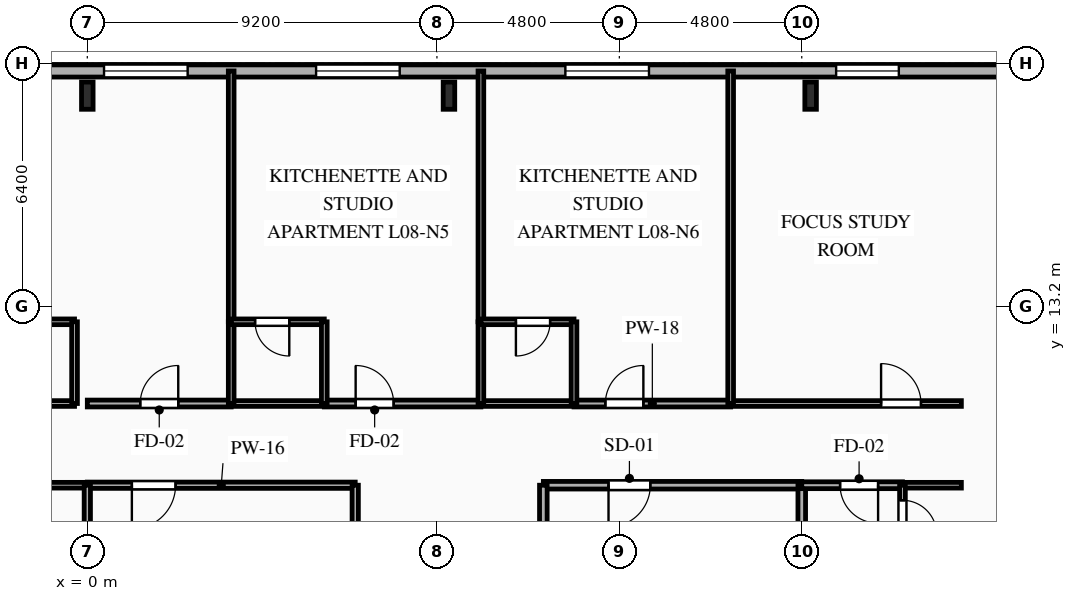
"""IFC4 building model, lengths in metres.
Left out: names, types, materials, properties, quantities, classifications, styles, units other than length and angle.
Written with IfcOpenShell. Run it as: python <this file> out.ifc"""

import sys

from ifc_helpers import new_model, si_unit, direction, frame, frame_2d, origin, origin_2d, place, context, subcontext, project, spatial, rectangle, i_section, extrude, element, fill, save


model = new_model("IFC4")
c1 = context("Model", 3, precision=1e-05, world=origin(), true_north=direction((0.0, 1.0)))
c2 = subcontext(c1, "Body", "Model", "MODEL_VIEW")
j1 = project(units=[si_unit("LENGTHUNIT", "METRE"), si_unit("PLANEANGLEUNIT", "RADIAN")], contexts=[c1])
p1 = place(None, origin())
s1 = spatial("IfcSite", under=j1, at=p1, CompositionType="ELEMENT")
p2 = place(p1, origin())
s2 = spatial("IfcBuilding", under=s1, at=p2, CompositionType="ELEMENT")
p3 = place(p2, frame((0.0, 0.0, 33.7)))
s3 = spatial("IfcBuildingStorey", under=s2, at=p3, CompositionType="ELEMENT", Elevation=33.7)
for number, where, z_axis, x_axis in (
    (1, (19.033, 18.75, 0.0), (0.0, 0.0, 1.0), (1.0, 0.0, 0.0)),
    (2, (9.517, 18.75, 0.0), (0.0, 0.0, 1.0), (1.0, 0.0, 0.0)),
    (3, (0.0, 18.75, 0.0), (0.0, 0.0, 1.0), (1.0, 0.0, 0.0)),
):
    element("IfcColumn", number, at=place(p3, frame(where, z_axis=z_axis, x_axis=x_axis)), inside=s3, PredefinedType="COLUMN", context=c2, shape_type="SweptSolid", body=[
        extrude(i_section(OverallWidth=0.304, OverallDepth=0.716, WebThickness=0.021, FlangeThickness=0.04, FilletRadius=0.027, at=origin_2d()), origin(), (0.0, 0.0, 1.0), 3.35),
    ])
p4 = place(p3, frame((-29.2, 19.4, 0.0), z_axis=(0.0, 0.0, 1.0), x_axis=(1.0, 0.0, 0.0)))
e4 = element("IfcWall", 4, at=p4, inside=s3, PredefinedType="SOLIDWALL", context=c2, shape_type="SweptSolid", body=[
    extrude(rectangle(XDim=58.4, YDim=0.32, at=frame_2d((29.2, 0.0))), origin(), (0.0, 0.0, 1.0), 3.035),
])
p5 = place(p4, frame((8.261, 0.0, 0.85)))
e5 = element("IfcOpeningElement", 5, at=p5, cuts=e4, PredefinedType="OPENING", context=c2, shape_type="SweptSolid", body=[
    extrude(rectangle(XDim=1.65, YDim=1.85, at=frame_2d((0.825, 0.925))), frame((0.0, 0.17, 0.0), z_axis=(0.0, -1.0, 0.0), x_axis=(1.0, 0.0, 0.0)), (0.0, 0.0, 1.0), 0.34),
])
p6 = place(p4, frame((17.05, 0.0, 0.85)))
e6 = element("IfcOpeningElement", 6, at=p6, cuts=e4, PredefinedType="OPENING", context=c2, shape_type="SweptSolid", body=[
    extrude(rectangle(XDim=1.5, YDim=1.85, at=frame_2d((0.75, 0.925))), frame((0.0, 0.17, 0.0), z_axis=(0.0, -1.0, 0.0), x_axis=(1.0, 0.0, 0.0)), (0.0, 0.0, 1.0), 0.34),
])
p7 = place(p4, frame((22.1, 0.0, 0.85)))
e7 = element("IfcOpeningElement", 7, at=p7, cuts=e4, PredefinedType="OPENING", context=c2, shape_type="SweptSolid", body=[
    extrude(rectangle(XDim=2.2, YDim=1.85, at=frame_2d((1.1, 0.925))), frame((0.0, 0.17, 0.0), z_axis=(0.0, -1.0, 0.0), x_axis=(1.0, 0.0, 0.0)), (0.0, 0.0, 1.0), 0.34),
])
p8 = place(p4, frame((29.64, 0.0, 0.85)))
e8 = element("IfcOpeningElement", 8, at=p8, cuts=e4, PredefinedType="OPENING", context=c2, shape_type="SweptSolid", body=[
    extrude(rectangle(XDim=2.2, YDim=1.85, at=frame_2d((1.1, 0.925))), frame((0.0, 0.17, 0.0), z_axis=(0.0, -1.0, 0.0), x_axis=(1.0, 0.0, 0.0)), (0.0, 0.0, 1.0), 0.34),
])
p9 = place(p4, frame((35.22, 0.0, 0.85)))
e9 = element("IfcOpeningElement", 9, at=p9, cuts=e4, PredefinedType="OPENING", context=c2, shape_type="SweptSolid", body=[
    extrude(rectangle(XDim=2.2, YDim=1.85, at=frame_2d((1.1, 0.925))), frame((0.0, 0.17, 0.0), z_axis=(0.0, -1.0, 0.0), x_axis=(1.0, 0.0, 0.0)), (0.0, 0.0, 1.0), 0.34),
])
p10 = place(p4, frame((41.78, 0.0, 0.85)))
e10 = element("IfcOpeningElement", 10, at=p10, cuts=e4, PredefinedType="OPENING", context=c2, shape_type="SweptSolid", body=[
    extrude(rectangle(XDim=2.2, YDim=1.85, at=frame_2d((1.1, 0.925))), frame((0.0, 0.17, 0.0), z_axis=(0.0, -1.0, 0.0), x_axis=(1.0, 0.0, 0.0)), (0.0, 0.0, 1.0), 0.34),
])
p11 = place(p4, frame((48.905, 0.0, 0.85)))
e11 = element("IfcOpeningElement", 11, at=p11, cuts=e4, PredefinedType="OPENING", context=c2, shape_type="SweptSolid", body=[
    extrude(rectangle(XDim=1.65, YDim=1.85, at=frame_2d((0.825, 0.925))), frame((0.0, 0.17, 0.0), z_axis=(0.0, -1.0, 0.0), x_axis=(1.0, 0.0, 0.0)), (0.0, 0.0, 1.0), 0.34),
])
p12 = place(p3, frame((18.8, 8.5, 0.0), z_axis=(0.0, 0.0, 1.0), x_axis=(-1.0, 0.0, 0.0)))
e12 = element("IfcWall", 12, at=p12, inside=s3, PredefinedType="PARTITIONING", context=c2, shape_type="SweptSolid", body=[
    extrude(rectangle(XDim=6.8, YDim=0.2, at=frame_2d((3.4, 0.0))), origin(), (0.0, 0.0, 1.0), 3.035),
])
p13 = place(p12, frame((3.985, 0.0, 0.0)))
e13 = element("IfcOpeningElement", 13, at=p13, cuts=e12, PredefinedType="OPENING", context=c2, shape_type="SweptSolid", body=[
    extrude(rectangle(XDim=1.1, YDim=2.15, at=frame_2d((0.55, 1.075))), frame((0.0, 0.11, 0.0), z_axis=(0.0, -1.0, 0.0), x_axis=(1.0, 0.0, 0.0)), (0.0, 0.0, 1.0), 0.22),
])
p14 = place(p3, frame((12.0, 8.5, 0.0), z_axis=(0.0, 0.0, 1.0), x_axis=(0.0, -1.0, 0.0)))
e14 = element("IfcWall", 14, at=p14, inside=s3, PredefinedType="PARTITIONING", context=c2, shape_type="SweptSolid", body=[
    extrude(rectangle(XDim=2.9, YDim=0.2, at=frame_2d((1.45, 0.0))), origin(), (0.0, 0.0, 1.0), 3.035),
])
p15 = place(p3, frame((18.8, 5.6, 0.0), z_axis=(0.0, 0.0, 1.0), x_axis=(0.0, 1.0, 0.0)))
e15 = element("IfcWall", 15, at=p15, inside=s3, PredefinedType="PARTITIONING", context=c2, shape_type="SweptSolid", body=[
    extrude(rectangle(XDim=2.9, YDim=0.2, at=frame_2d((1.45, 0.0))), origin(), (0.0, 0.0, 1.0), 2.52),
])
p16 = place(p3, frame((-2.786, 10.65, 0.0), z_axis=(0.0, 0.0, 1.0), x_axis=(1.0, 0.0, 0.0)))
e16 = element("IfcWall", 16, at=p16, inside=s3, PredefinedType="PLUMBINGWALL", context=c2, shape_type="SweptSolid", body=[
    extrude(rectangle(XDim=2.45, YDim=0.15, at=frame_2d((1.225, 0.0))), origin(), (0.0, 0.0, 1.0), 3.035),
])
p17 = place(p3, frame((0.0, 8.5, 0.0), z_axis=(0.0, 0.0, 1.0), x_axis=(-1.0, 0.0, 0.0)))
e17 = element("IfcWall", 17, at=p17, inside=s3, PredefinedType="PARTITIONING", context=c2, shape_type="SweptSolid", body=[
    extrude(rectangle(XDim=7.05, YDim=0.15, at=frame_2d((3.525, 0.0))), origin(), (0.0, 0.0, 1.0), 3.035),
])
p18 = place(p3, frame((21.45, 8.5, 0.0), z_axis=(0.0, 0.0, 1.0), x_axis=(-1.0, 0.0, 0.0)))
e18 = element("IfcWall", 18, at=p18, inside=s3, PredefinedType="PARTITIONING", context=c2, shape_type="SweptSolid", body=[
    extrude(rectangle(XDim=2.65, YDim=0.18, at=frame_2d((1.325, 0.0))), origin(), (0.0, 0.0, 1.0), 3.035),
])
p19 = place(p18, frame((0.641, 0.0, 0.0)))
e19 = element("IfcOpeningElement", 19, at=p19, cuts=e18, PredefinedType="OPENING", context=c2, shape_type="SweptSolid", body=[
    extrude(rectangle(XDim=1.0, YDim=2.15, at=frame_2d((0.5, 1.075))), frame((0.0, 0.1, 0.0), z_axis=(0.0, -1.0, 0.0), x_axis=(1.0, 0.0, 0.0)), (0.0, 0.0, 1.0), 0.2),
])
p20 = place(p3, frame((23.0, 8.5, 0.0), z_axis=(0.0, 0.0, 1.0), x_axis=(-1.0, 0.0, 0.0)))
e20 = element("IfcWall", 20, at=p20, inside=s3, PredefinedType="PARTITIONING", context=c2, shape_type="SweptSolid", body=[
    extrude(rectangle(XDim=1.55, YDim=0.15, at=frame_2d((0.775, 0.0))), origin(), (0.0, 0.0, 1.0), 3.035),
])
p21 = place(p3, frame((0.0, 10.65, 0.0), z_axis=(0.0, 0.0, 1.0), x_axis=(1.0, 0.0, 0.0)))
e21 = element("IfcWall", 21, at=p21, inside=s3, PredefinedType="PARTITIONING", context=c2, shape_type="SweptSolid", body=[
    extrude(rectangle(XDim=3.786, YDim=0.18, at=frame_2d((1.893, 0.0))), origin(), (0.0, 0.0, 1.0), 3.035),
])
p22 = place(p21, frame((1.393, 0.0, 0.0)))
e22 = element("IfcOpeningElement", 22, at=p22, cuts=e21, PredefinedType="OPENING", context=c2, shape_type="SweptSolid", body=[
    extrude(rectangle(XDim=1.0, YDim=2.15, at=frame_2d((0.5, 1.075))), frame((0.0, 0.1, 0.0), z_axis=(0.0, -1.0, 0.0), x_axis=(1.0, 0.0, 0.0)), (0.0, 0.0, 1.0), 0.2),
])
p23 = place(p3, frame((6.236, 10.65, 0.0), z_axis=(0.0, 0.0, 1.0), x_axis=(1.0, 0.0, 0.0)))
e23 = element("IfcWall", 23, at=p23, inside=s3, PredefinedType="PARTITIONING", context=c2, shape_type="SweptSolid", body=[
    extrude(rectangle(XDim=4.121, YDim=0.18, at=frame_2d((2.061, 0.0))), origin(), (0.0, 0.0, 1.0), 3.035),
])
p24 = place(p23, frame((0.825, 0.0, 0.0)))
e24 = element("IfcOpeningElement", 24, at=p24, cuts=e23, PredefinedType="OPENING", context=c2, shape_type="SweptSolid", body=[
    extrude(rectangle(XDim=1.0, YDim=2.15, at=frame_2d((0.5, 1.075))), frame((0.0, 0.1, 0.0), z_axis=(0.0, -1.0, 0.0), x_axis=(1.0, 0.0, 0.0)), (0.0, 0.0, 1.0), 0.2),
])
p25 = place(p3, frame((3.786, 10.65, 0.0), z_axis=(0.0, 0.0, 1.0), x_axis=(1.0, 0.0, 0.0)))
e25 = element("IfcWall", 25, at=p25, inside=s3, PredefinedType="PLUMBINGWALL", context=c2, shape_type="SweptSolid", body=[
    extrude(rectangle(XDim=2.45, YDim=0.15, at=frame_2d((1.225, 0.0))), origin(), (0.0, 0.0, 1.0), 3.035),
])
p26 = place(p3, frame((12.807, 10.65, 0.0), z_axis=(0.0, 0.0, 1.0), x_axis=(1.0, 0.0, 0.0)))
e26 = element("IfcWall", 26, at=p26, inside=s3, PredefinedType="PARTITIONING", context=c2, shape_type="SweptSolid", body=[
    extrude(rectangle(XDim=4.122, YDim=0.18, at=frame_2d((2.061, 0.0))), origin(), (0.0, 0.0, 1.0), 3.035),
])
p27 = place(p26, frame((0.825, 0.0, 0.0)))
e27 = element("IfcOpeningElement", 27, at=p27, cuts=e26, PredefinedType="OPENING", context=c2, shape_type="SweptSolid", body=[
    extrude(rectangle(XDim=1.0, YDim=2.15, at=frame_2d((0.5, 1.075))), frame((0.0, 0.1, 0.0), z_axis=(0.0, -1.0, 0.0), x_axis=(1.0, 0.0, 0.0)), (0.0, 0.0, 1.0), 0.2),
])
p28 = place(p3, frame((10.357, 10.65, 0.0), z_axis=(0.0, 0.0, 1.0), x_axis=(1.0, 0.0, 0.0)))
e28 = element("IfcWall", 28, at=p28, inside=s3, PredefinedType="PLUMBINGWALL", context=c2, shape_type="SweptSolid", body=[
    extrude(rectangle(XDim=2.45, YDim=0.15, at=frame_2d((1.225, 0.0))), origin(), (0.0, 0.0, 1.0), 3.035),
])
p29 = place(p3, frame((16.929, 10.65, 0.0), z_axis=(0.0, 0.0, 1.0), x_axis=(1.0, 0.0, 0.0)))
e29 = element("IfcWall", 29, at=p29, inside=s3, PredefinedType="PARTITIONING", context=c2, shape_type="SweptSolid", body=[
    extrude(rectangle(XDim=6.071, YDim=0.15, at=frame_2d((3.036, 0.0))), origin(), (0.0, 0.0, 1.0), 3.035),
])
p30 = place(p29, frame((3.958, 0.0, 0.0)))
e30 = element("IfcOpeningElement", 30, at=p30, cuts=e29, PredefinedType="OPENING", context=c2, shape_type="SweptSolid", body=[
    extrude(rectangle(XDim=1.05, YDim=2.15, at=frame_2d((0.525, 1.075))), frame((0.0, 0.085, 0.0), z_axis=(0.0, -1.0, 0.0), x_axis=(1.0, 0.0, 0.0)), (0.0, 0.0, 1.0), 0.17),
])
p31 = place(p3, frame((7.05, 8.5, 0.0), z_axis=(0.0, 0.0, 1.0), x_axis=(-1.0, 0.0, 0.0)))
e31 = element("IfcWall", 31, at=p31, inside=s3, PredefinedType="PARTITIONING", context=c2, shape_type="SweptSolid", body=[
    extrude(rectangle(XDim=7.05, YDim=0.165, at=frame_2d((3.525, 0.0))), origin(), (0.0, 0.0, 1.0), 3.035),
])
p32 = place(p31, frame((4.728, 0.0, 0.0)))
e32 = element("IfcOpeningElement", 32, at=p32, cuts=e31, PredefinedType="OPENING", context=c2, shape_type="SweptSolid", body=[
    extrude(rectangle(XDim=1.15, YDim=2.15, at=frame_2d((0.575, 1.075))), frame((0.0, 0.093, 0.0), z_axis=(0.0, -1.0, 0.0), x_axis=(1.0, 0.0, 0.0)), (0.0, 0.0, 1.0), 0.185),
])
p33 = place(p3, frame((7.05, 1.45, 0.0), z_axis=(0.0, 0.0, 1.0), x_axis=(0.0, 1.0, 0.0)))
e33 = element("IfcWall", 33, at=p33, inside=s3, PredefinedType="PARTITIONING", context=c2, shape_type="SweptSolid", body=[
    extrude(rectangle(XDim=7.05, YDim=0.165, at=frame_2d((3.525, 0.0))), origin(), (0.0, 0.0, 1.0), 3.035),
])
p34 = place(p3, frame((21.45, 8.5, 0.0), z_axis=(0.0, 0.0, 1.0), x_axis=(0.0, -1.0, 0.0)))
e34 = element("IfcWall", 34, at=p34, inside=s3, PredefinedType="PARTITIONING", context=c2, shape_type="SweptSolid", body=[
    extrude(rectangle(XDim=1.692, YDim=0.15, at=frame_2d((0.846, 0.0))), origin(), (0.0, 0.0, 1.0), 3.035),
])
p35 = place(p34, frame((0.396, 0.0, 0.0)))
e35 = element("IfcOpeningElement", 35, at=p35, cuts=e34, PredefinedType="OPENING", context=c2, shape_type="SweptSolid", body=[
    extrude(rectangle(XDim=0.9, YDim=2.1, at=frame_2d((0.45, 1.05))), frame((0.0, 0.085, 0.0), z_axis=(0.0, -1.0, 0.0), x_axis=(1.0, 0.0, 0.0)), (0.0, 0.0, 1.0), 0.17),
])
p36 = place(p3, frame((-0.336, 12.8, 0.0), z_axis=(0.0, 0.0, 1.0), x_axis=(-1.0, 0.0, 0.0)))
e36 = element("IfcWall", 36, at=p36, inside=s3, PredefinedType="PLUMBINGWALL", context=c2, shape_type="SweptSolid", body=[
    extrude(rectangle(XDim=2.45, YDim=0.15, at=frame_2d((1.225, 0.0))), origin(), (0.0, 0.0, 1.0), 3.035),
])
p37 = place(p36, frame((0.921, 0.0, 0.0)))
e37 = element("IfcOpeningElement", 37, at=p37, cuts=e36, PredefinedType="OPENING", context=c2, shape_type="SweptSolid", body=[
    extrude(rectangle(XDim=0.9, YDim=2.1, at=frame_2d((0.45, 1.05))), frame((0.0, 0.085, 0.0), z_axis=(0.0, -1.0, 0.0), x_axis=(1.0, 0.0, 0.0)), (0.0, 0.0, 1.0), 0.17),
])
p38 = place(p3, frame((-0.336, 10.65, 0.0), z_axis=(0.0, 0.0, 1.0), x_axis=(0.0, 1.0, 0.0)))
e38 = element("IfcWall", 38, at=p38, inside=s3, PredefinedType="PLUMBINGWALL", context=c2, shape_type="SweptSolid", body=[
    extrude(rectangle(XDim=2.15, YDim=0.15, at=frame_2d((1.075, 0.0))), origin(), (0.0, 0.0, 1.0), 3.035),
])
p39 = place(p3, frame((3.786, 19.4, 0.0), z_axis=(0.0, 0.0, 1.0), x_axis=(0.0, -1.0, 0.0)))
e39 = element("IfcWall", 39, at=p39, inside=s3, PredefinedType="PARTITIONING", context=c2, shape_type="SweptSolid", body=[
    extrude(rectangle(XDim=6.6, YDim=0.15, at=frame_2d((3.3, 0.0))), origin(), (0.0, 0.0, 1.0), 3.035),
])
p40 = place(p3, frame((3.786, 12.8, 0.0), z_axis=(0.0, 0.0, 1.0), x_axis=(0.0, -1.0, 0.0)))
e40 = element("IfcWall", 40, at=p40, inside=s3, PredefinedType="PLUMBINGWALL", context=c2, shape_type="SweptSolid", body=[
    extrude(rectangle(XDim=2.15, YDim=0.15, at=frame_2d((1.075, 0.0))), origin(), (0.0, 0.0, 1.0), 3.035),
])
p41 = place(p3, frame((6.236, 12.8, 0.0), z_axis=(0.0, 0.0, 1.0), x_axis=(-1.0, 0.0, 0.0)))
e41 = element("IfcWall", 41, at=p41, inside=s3, PredefinedType="PLUMBINGWALL", context=c2, shape_type="SweptSolid", body=[
    extrude(rectangle(XDim=2.45, YDim=0.15, at=frame_2d((1.225, 0.0))), origin(), (0.0, 0.0, 1.0), 3.035),
])
p42 = place(p41, frame((0.921, 0.0, 0.0)))
e42 = element("IfcOpeningElement", 42, at=p42, cuts=e41, PredefinedType="OPENING", context=c2, shape_type="SweptSolid", body=[
    extrude(rectangle(XDim=0.9, YDim=2.1, at=frame_2d((0.45, 1.05))), frame((0.0, 0.085, 0.0), z_axis=(0.0, -1.0, 0.0), x_axis=(1.0, 0.0, 0.0)), (0.0, 0.0, 1.0), 0.17),
])
p43 = place(p3, frame((6.236, 10.65, 0.0), z_axis=(0.0, 0.0, 1.0), x_axis=(0.0, 1.0, 0.0)))
e43 = element("IfcWall", 43, at=p43, inside=s3, PredefinedType="PLUMBINGWALL", context=c2, shape_type="SweptSolid", body=[
    extrude(rectangle(XDim=2.15, YDim=0.15, at=frame_2d((1.075, 0.0))), origin(), (0.0, 0.0, 1.0), 3.035),
])
p44 = place(p3, frame((10.357, 19.4, 0.0), z_axis=(0.0, 0.0, 1.0), x_axis=(0.0, -1.0, 0.0)))
e44 = element("IfcWall", 44, at=p44, inside=s3, PredefinedType="PARTITIONING", context=c2, shape_type="SweptSolid", body=[
    extrude(rectangle(XDim=6.6, YDim=0.15, at=frame_2d((3.3, 0.0))), origin(), (0.0, 0.0, 1.0), 3.035),
])
p45 = place(p3, frame((10.357, 12.8, 0.0), z_axis=(0.0, 0.0, 1.0), x_axis=(0.0, -1.0, 0.0)))
e45 = element("IfcWall", 45, at=p45, inside=s3, PredefinedType="PLUMBINGWALL", context=c2, shape_type="SweptSolid", body=[
    extrude(rectangle(XDim=2.15, YDim=0.15, at=frame_2d((1.075, 0.0))), origin(), (0.0, 0.0, 1.0), 3.035),
])
p46 = place(p3, frame((12.807, 12.8, 0.0), z_axis=(0.0, 0.0, 1.0), x_axis=(-1.0, 0.0, 0.0)))
e46 = element("IfcWall", 46, at=p46, inside=s3, PredefinedType="PLUMBINGWALL", context=c2, shape_type="SweptSolid", body=[
    extrude(rectangle(XDim=2.45, YDim=0.15, at=frame_2d((1.225, 0.0))), origin(), (0.0, 0.0, 1.0), 3.035),
])
p47 = place(p46, frame((0.629, 0.0, 0.0)))
e47 = element("IfcOpeningElement", 47, at=p47, cuts=e46, PredefinedType="OPENING", context=c2, shape_type="SweptSolid", body=[
    extrude(rectangle(XDim=0.9, YDim=2.1, at=frame_2d((0.45, 1.05))), frame((0.0, 0.085, 0.0), z_axis=(0.0, -1.0, 0.0), x_axis=(1.0, 0.0, 0.0)), (0.0, 0.0, 1.0), 0.17),
])
p48 = place(p3, frame((12.807, 10.65, 0.0), z_axis=(0.0, 0.0, 1.0), x_axis=(0.0, 1.0, 0.0)))
e48 = element("IfcWall", 48, at=p48, inside=s3, PredefinedType="PLUMBINGWALL", context=c2, shape_type="SweptSolid", body=[
    extrude(rectangle(XDim=2.15, YDim=0.15, at=frame_2d((1.075, 0.0))), origin(), (0.0, 0.0, 1.0), 3.035),
])
p49 = place(p3, frame((16.929, 19.4, 0.0), z_axis=(0.0, 0.0, 1.0), x_axis=(0.0, -1.0, 0.0)))
e49 = element("IfcWall", 49, at=p49, inside=s3, PredefinedType="PARTITIONING", context=c2, shape_type="SweptSolid", body=[
    extrude(rectangle(XDim=8.75, YDim=0.15, at=frame_2d((4.375, 0.0))), origin(), (0.0, 0.0, 1.0), 3.035),
])
p50 = place(p3, frame((0.0, 8.5, 0.0), z_axis=(0.0, 0.0, 1.0), x_axis=(0.0, -1.0, 0.0)))
e50 = element("IfcWall", 50, at=p50, inside=s3, PredefinedType="PARTITIONING", context=c2, shape_type="SweptSolid", body=[
    extrude(rectangle(XDim=7.05, YDim=0.165, at=frame_2d((3.525, 0.0))), origin(), (0.0, 0.0, 1.0), 3.035),
])
p51 = place(p8, origin())
e51 = element("IfcWindow", 51, at=p51, inside=s3, PartitioningType="SINGLE_PANEL", PredefinedType="WINDOW", context=c2, shape_type="SweptSolid", body=[
    extrude(rectangle(XDim=2.2, YDim=1.85, at=frame_2d((1.1, 0.925))), frame((0.0, 0.03, 0.0), z_axis=(0.0, -1.0, 0.0), x_axis=(1.0, 0.0, 0.0)), (0.0, 0.0, 1.0), 0.06),
])
fill(e8, e51)
p52 = place(p9, origin())
e52 = element("IfcWindow", 52, at=p52, inside=s3, PartitioningType="SINGLE_PANEL", PredefinedType="WINDOW", context=c2, shape_type="SweptSolid", body=[
    extrude(rectangle(XDim=2.2, YDim=1.85, at=frame_2d((1.1, 0.925))), frame((0.0, 0.03, 0.0), z_axis=(0.0, -1.0, 0.0), x_axis=(1.0, 0.0, 0.0)), (0.0, 0.0, 1.0), 0.06),
])
fill(e9, e52)
p53 = place(p10, origin())
e53 = element("IfcWindow", 53, at=p53, inside=s3, PartitioningType="SINGLE_PANEL", PredefinedType="WINDOW", context=c2, shape_type="SweptSolid", body=[
    extrude(rectangle(XDim=2.2, YDim=1.85, at=frame_2d((1.1, 0.925))), frame((0.0, 0.03, 0.0), z_axis=(0.0, -1.0, 0.0), x_axis=(1.0, 0.0, 0.0)), (0.0, 0.0, 1.0), 0.06),
])
fill(e10, e53)
p54 = place(p11, origin())
e54 = element("IfcWindow", 54, at=p54, inside=s3, PartitioningType="SINGLE_PANEL", PredefinedType="WINDOW", context=c2, shape_type="SweptSolid", body=[
    extrude(rectangle(XDim=1.65, YDim=1.85, at=frame_2d((0.825, 0.925))), frame((0.0, 0.03, 0.0), z_axis=(0.0, -1.0, 0.0), x_axis=(1.0, 0.0, 0.0)), (0.0, 0.0, 1.0), 0.06),
])
fill(e11, e54)
p55 = place(p13, origin())
e55 = element("IfcDoor", 55, at=p55, inside=s3, OperationType="SINGLE_SWING_RIGHT", PredefinedType="DOOR", context=c2, shape_type="SweptSolid", body=[
    extrude(rectangle(XDim=1.1, YDim=2.15, at=frame_2d((0.55, 1.075))), frame((0.0, 0.025, 0.0), z_axis=(0.0, -1.0, 0.0), x_axis=(1.0, 0.0, 0.0)), (0.0, 0.0, 1.0), 0.05),
])
fill(e13, e55)
p56 = place(p19, origin())
e56 = element("IfcDoor", 56, at=p56, inside=s3, OperationType="SINGLE_SWING_LEFT", PredefinedType="DOOR", context=c2, shape_type="SweptSolid", body=[
    extrude(rectangle(XDim=1.0, YDim=2.15, at=frame_2d((0.5, 1.075))), frame((0.0, 0.025, 0.0), z_axis=(0.0, -1.0, 0.0), x_axis=(1.0, 0.0, 0.0)), (0.0, 0.0, 1.0), 0.05),
])
fill(e19, e56)
p57 = place(p22, origin())
e57 = element("IfcDoor", 57, at=p57, inside=s3, OperationType="SINGLE_SWING_RIGHT", PredefinedType="DOOR", context=c2, shape_type="SweptSolid", body=[
    extrude(rectangle(XDim=1.0, YDim=2.15, at=frame_2d((0.5, 1.075))), frame((0.0, 0.025, 0.0), z_axis=(0.0, -1.0, 0.0), x_axis=(1.0, 0.0, 0.0)), (0.0, 0.0, 1.0), 0.05),
])
fill(e22, e57)
p58 = place(p24, origin())
e58 = element("IfcDoor", 58, at=p58, inside=s3, OperationType="SINGLE_SWING_LEFT", PredefinedType="DOOR", context=c2, shape_type="SweptSolid", body=[
    extrude(rectangle(XDim=1.0, YDim=2.15, at=frame_2d((0.5, 1.075))), frame((0.0, 0.025, 0.0), z_axis=(0.0, -1.0, 0.0), x_axis=(1.0, 0.0, 0.0)), (0.0, 0.0, 1.0), 0.05),
])
fill(e24, e58)
p59 = place(p27, origin())
e59 = element("IfcDoor", 59, at=p59, inside=s3, OperationType="SINGLE_SWING_RIGHT", PredefinedType="DOOR", context=c2, shape_type="SweptSolid", body=[
    extrude(rectangle(XDim=1.0, YDim=2.15, at=frame_2d((0.5, 1.075))), frame((0.0, 0.025, 0.0), z_axis=(0.0, -1.0, 0.0), x_axis=(1.0, 0.0, 0.0)), (0.0, 0.0, 1.0), 0.05),
])
fill(e27, e59)
p60 = place(p30, origin())
e60 = element("IfcDoor", 60, at=p60, inside=s3, OperationType="SINGLE_SWING_LEFT", PredefinedType="DOOR", context=c2, shape_type="SweptSolid", body=[
    extrude(rectangle(XDim=1.05, YDim=2.15, at=frame_2d((0.525, 1.075))), frame((0.0, 0.025, 0.0), z_axis=(0.0, -1.0, 0.0), x_axis=(1.0, 0.0, 0.0)), (0.0, 0.0, 1.0), 0.05),
])
fill(e30, e60)
p61 = place(p32, origin())
e61 = element("IfcDoor", 61, at=p61, inside=s3, OperationType="SINGLE_SWING_RIGHT", PredefinedType="DOOR", context=c2, shape_type="SweptSolid", body=[
    extrude(rectangle(XDim=1.15, YDim=2.15, at=frame_2d((0.575, 1.075))), frame((0.0, 0.025, 0.0), z_axis=(0.0, -1.0, 0.0), x_axis=(1.0, 0.0, 0.0)), (0.0, 0.0, 1.0), 0.05),
])
fill(e32, e61)
p62 = place(p35, origin())
e62 = element("IfcDoor", 62, at=p62, inside=s3, OperationType="SINGLE_SWING_RIGHT", PredefinedType="DOOR", context=c2, shape_type="SweptSolid", body=[
    extrude(rectangle(XDim=0.9, YDim=2.1, at=frame_2d((0.45, 1.05))), frame((0.0, 0.025, 0.0), z_axis=(0.0, -1.0, 0.0), x_axis=(1.0, 0.0, 0.0)), (0.0, 0.0, 1.0), 0.05),
])
fill(e35, e62)
p63 = place(p42, origin())
e63 = element("IfcDoor", 63, at=p63, inside=s3, OperationType="SINGLE_SWING_LEFT", PredefinedType="DOOR", context=c2, shape_type="SweptSolid", body=[
    extrude(rectangle(XDim=0.9, YDim=2.1, at=frame_2d((0.45, 1.05))), frame((0.0, 0.025, 0.0), z_axis=(0.0, -1.0, 0.0), x_axis=(1.0, 0.0, 0.0)), (0.0, 0.0, 1.0), 0.05),
])
fill(e42, e63)
p64 = place(p47, origin())
e64 = element("IfcDoor", 64, at=p64, inside=s3, OperationType="SINGLE_SWING_RIGHT", PredefinedType="DOOR", context=c2, shape_type="SweptSolid", body=[
    extrude(rectangle(XDim=0.9, YDim=2.1, at=frame_2d((0.45, 1.05))), frame((0.0, 0.025, 0.0), z_axis=(0.0, -1.0, 0.0), x_axis=(1.0, 0.0, 0.0)), (0.0, 0.0, 1.0), 0.05),
])
fill(e47, e64)
save(model, sys.argv[1])
